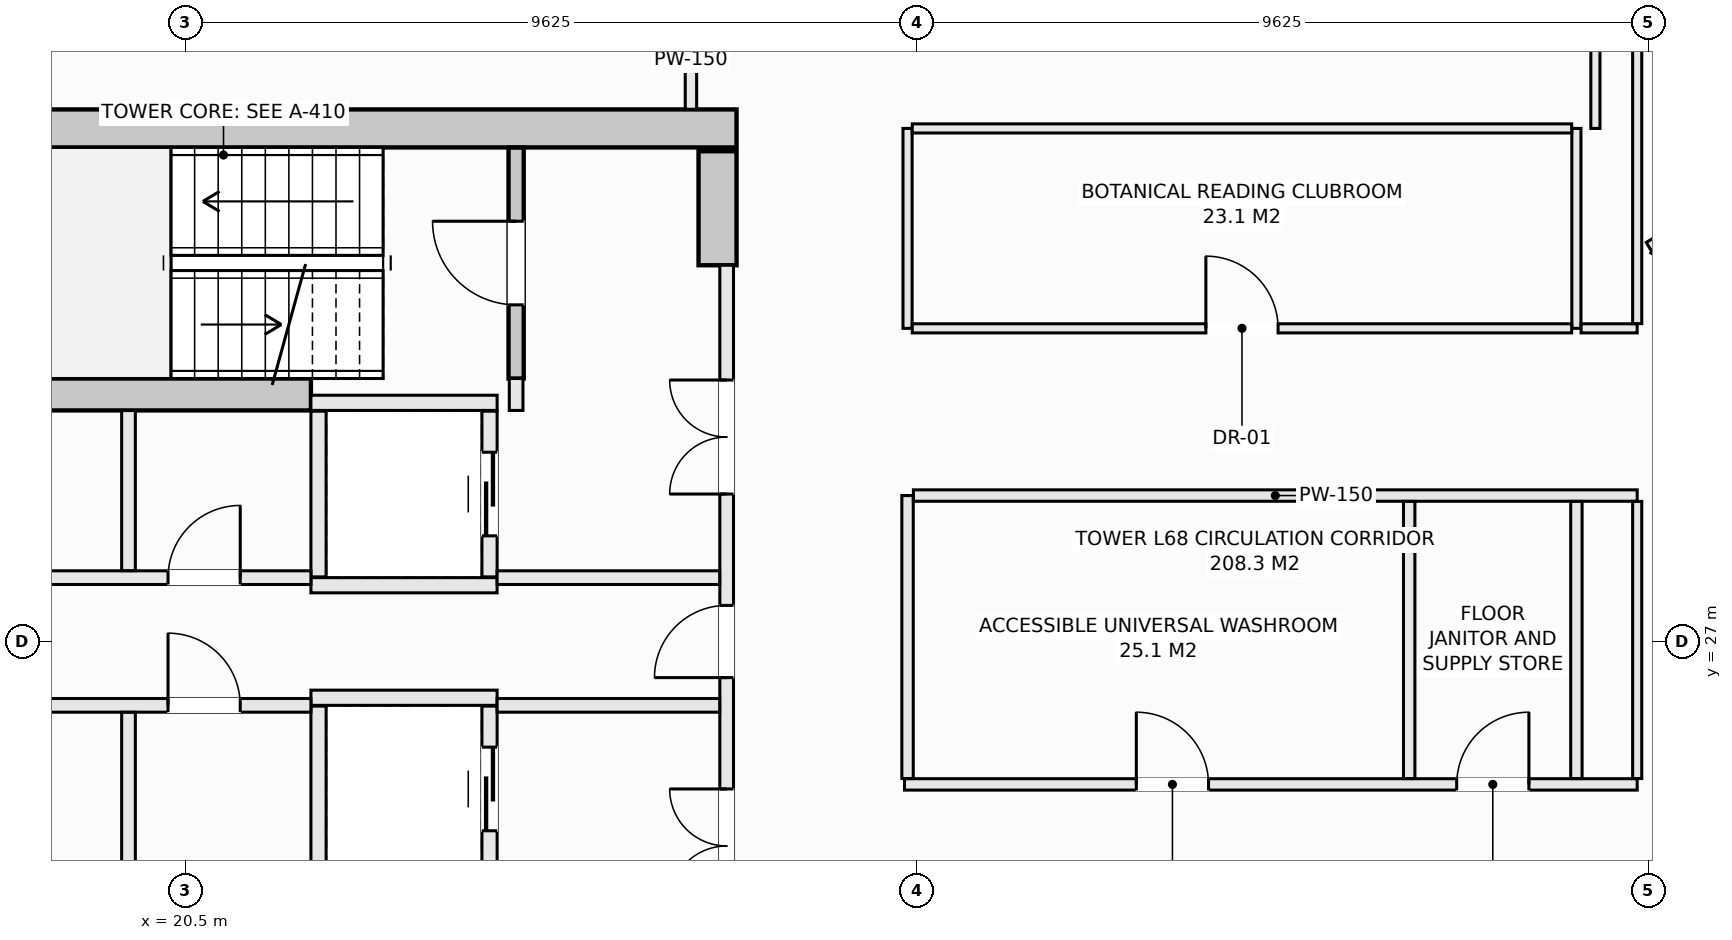
"""IFC4 building model, lengths in metres.
Left out: names, types, materials, properties, quantities, classifications, styles, units other than length and angle.
Written with IfcOpenShell. Run it as: python <this file> out.ifc"""

import sys

from ifc_helpers import new_model, si_unit, direction, frame, frame_2d, origin, place, context, subcontext, project, spatial, rectangle, extrude, element, fill, save


model = new_model("IFC4")
c1 = context("Model", 3, precision=1e-05, world=origin(), true_north=direction((0.0, 1.0)))
c2 = subcontext(c1, "Body", "Model", "MODEL_VIEW")
j1 = project(units=[si_unit("LENGTHUNIT", "METRE"), si_unit("PLANEANGLEUNIT", "RADIAN")], contexts=[c1])
p1 = place(None, origin())
s1 = spatial("IfcSite", under=j1, at=p1, CompositionType="ELEMENT")
p2 = place(p1, origin())
s2 = spatial("IfcBuilding", under=s1, at=p2, CompositionType="ELEMENT")
p3 = place(p2, frame((0.0, 0.0, 252.5)))
s3 = spatial("IfcBuildingStorey", under=s2, at=p3, CompositionType="ELEMENT", Elevation=252.5)
p4 = place(p3, frame((14.25, 33.75, -0.27), z_axis=(0.0, 0.0, 1.0), x_axis=(1.0, 0.0, 0.0)))
e1 = element("IfcWall", 1, at=p4, inside=s3, PredefinedType="SHEAR", context=c2, shape_type="SweptSolid", body=[
    extrude(rectangle(XDim=13.5, YDim=0.5, at=frame_2d((6.75, 0.0))), origin(), (0.0, 0.0, 1.0), 3.3),
])
p5 = place(p3, frame((27.5, 31.95, -0.27), z_axis=(0.0, 0.0, 1.0), x_axis=(0.0, 1.0, 0.0)))
e2 = element("IfcWall", 2, at=p5, inside=s3, PredefinedType="SHEAR", context=c2, shape_type="SweptSolid", body=[
    extrude(rectangle(XDim=1.5, YDim=0.5, at=frame_2d((0.75, 0.0))), origin(), (0.0, 0.0, 1.0), 3.3),
])
p6 = place(p3, frame((14.85, 30.25, -0.27), z_axis=(0.0, 0.0, 1.0), x_axis=(1.0, 0.0, 0.0)))
e3 = element("IfcWall", 3, at=p6, inside=s3, PredefinedType="SHEAR", context=c2, shape_type="SweptSolid", body=[
    extrude(rectangle(XDim=7.3, YDim=0.42, at=frame_2d((3.65, 0.0))), origin(), (0.0, 0.0, 1.0), 3.3),
])
p7 = place(p3, frame((24.85, 30.46, -0.27), z_axis=(0.0, 0.0, 1.0), x_axis=(0.0, 1.0, 0.0)))
e4 = element("IfcWall", 4, at=p7, inside=s3, PredefinedType="SHEAR", context=c2, shape_type="SweptSolid", body=[
    extrude(rectangle(XDim=3.038, YDim=0.2, at=frame_2d((1.519, 0.0))), origin(), (0.0, 0.0, 1.0), 3.3),
])
p8 = place(p7, frame((0.969, 0.0, 0.27)))
e5 = element("IfcOpeningElement", 5, at=p8, cuts=e4, PredefinedType="OPENING", context=c2, shape_type="SweptSolid", body=[
    extrude(rectangle(XDim=1.1, YDim=2.15, at=frame_2d((0.55, 1.075))), frame((0.0, 0.11, 0.0), z_axis=(0.0, -1.0, 0.0), x_axis=(1.0, 0.0, 0.0)), (0.0, 0.0, 1.0), 0.22),
])
for number, where, z_axis, x_axis in (
    (6, (22.15, 30.14, 0.0), (0.0, 0.0, 1.0), (1.0, 0.0, 0.0)),
    (7, (22.15, 27.74, 0.0), (0.0, 0.0, 1.0), (1.0, 0.0, 0.0)),
):
    element("IfcWall", number, at=place(p3, frame(where, z_axis=z_axis, x_axis=x_axis)), inside=s3, PredefinedType="SOLIDWALL", context=c2, shape_type="SweptSolid", body=[
        extrude(rectangle(XDim=2.45, YDim=0.2, at=frame_2d((1.225, 0.0))), origin(), (0.0, 0.0, 1.0), 3.03),
    ])
p9 = place(p3, frame((22.25, 27.85, 0.0), z_axis=(0.0, 0.0, 1.0), x_axis=(0.0, 1.0, 0.0)))
e8 = element("IfcWall", 8, at=p9, inside=s3, PredefinedType="SOLIDWALL", context=c2, shape_type="SweptSolid", body=[
    extrude(rectangle(XDim=2.18, YDim=0.2, at=frame_2d((1.09, 0.0))), origin(), (0.0, 0.0, 1.0), 3.03),
])
p10 = place(p3, frame((24.5, 27.85, 0.0), z_axis=(0.0, 0.0, 1.0), x_axis=(0.0, 1.0, 0.0)))
e9 = element("IfcWall", 9, at=p10, inside=s3, PredefinedType="SOLIDWALL", context=c2, shape_type="SweptSolid", body=[
    extrude(rectangle(XDim=2.18, YDim=0.2, at=frame_2d((1.09, 0.0))), origin(), (0.0, 0.0, 1.0), 3.03),
])
p11 = place(p10, frame((0.54, 0.0, 0.0)))
e10 = element("IfcOpeningElement", 10, at=p11, cuts=e9, PredefinedType="OPENING", context=c2, shape_type="SweptSolid", body=[
    extrude(rectangle(XDim=1.1, YDim=2.2, at=frame_2d((0.55, 1.1))), frame((0.0, 0.11, 0.0), z_axis=(0.0, -1.0, 0.0), x_axis=(1.0, 0.0, 0.0)), (0.0, 0.0, 1.0), 0.22),
])
p12 = place(p3, frame((22.15, 26.26, 0.0), z_axis=(0.0, 0.0, 1.0), x_axis=(1.0, 0.0, 0.0)))
e11 = element("IfcWall", 11, at=p12, inside=s3, PredefinedType="SOLIDWALL", context=c2, shape_type="SweptSolid", body=[
    extrude(rectangle(XDim=2.45, YDim=0.2, at=frame_2d((1.225, 0.0))), origin(), (0.0, 0.0, 1.0), 3.03),
])
p13 = place(p3, frame((22.25, 23.97, 0.0), z_axis=(0.0, 0.0, 1.0), x_axis=(0.0, 1.0, 0.0)))
e12 = element("IfcWall", 12, at=p13, inside=s3, PredefinedType="SOLIDWALL", context=c2, shape_type="SweptSolid", body=[
    extrude(rectangle(XDim=2.18, YDim=0.2, at=frame_2d((1.09, 0.0))), origin(), (0.0, 0.0, 1.0), 3.03),
])
p14 = place(p3, frame((24.5, 23.97, 0.0), z_axis=(0.0, 0.0, 1.0), x_axis=(0.0, 1.0, 0.0)))
e13 = element("IfcWall", 13, at=p14, inside=s3, PredefinedType="SOLIDWALL", context=c2, shape_type="SweptSolid", body=[
    extrude(rectangle(XDim=2.18, YDim=0.2, at=frame_2d((1.09, 0.0))), origin(), (0.0, 0.0, 1.0), 3.03),
])
p15 = place(p14, frame((0.54, 0.0, 0.0)))
e14 = element("IfcOpeningElement", 14, at=p15, cuts=e13, PredefinedType="OPENING", context=c2, shape_type="SweptSolid", body=[
    extrude(rectangle(XDim=1.1, YDim=2.2, at=frame_2d((0.55, 1.1))), frame((0.0, 0.11, 0.0), z_axis=(0.0, -1.0, 0.0), x_axis=(1.0, 0.0, 0.0)), (0.0, 0.0, 1.0), 0.22),
])
p16 = place(p3, frame((24.85, 30.04, 0.0), z_axis=(0.0, 0.0, 1.0), x_axis=(0.0, 1.0, 0.0)))
e15 = element("IfcWall", 15, at=p16, inside=s3, PredefinedType="SOLIDWALL", context=c2, shape_type="SweptSolid", body=[
    extrude(rectangle(XDim=0.42, YDim=0.18, at=frame_2d((0.21, 0.0))), origin(), (0.0, 0.0, 1.0), 3.03),
])
p17 = place(p3, frame((27.62, 22.05, 0.0), z_axis=(0.0, 0.0, 1.0), x_axis=(0.0, 1.0, 0.0)))
e16 = element("IfcWall", 16, at=p17, inside=s3, PredefinedType="SOLIDWALL", context=c2, shape_type="SweptSolid", body=[
    extrude(rectangle(XDim=9.9, YDim=0.18, at=frame_2d((4.95, 0.0))), origin(), (0.0, 0.0, 1.0), 3.03),
])
p18 = place(p17, frame((4.475, 0.0, 0.0)))
e17 = element("IfcOpeningElement", 17, at=p18, cuts=e16, PredefinedType="OPENING", context=c2, shape_type="SweptSolid", body=[
    extrude(rectangle(XDim=0.95, YDim=2.1, at=frame_2d((0.475, 1.05))), frame((0.0, 0.1, 0.0), z_axis=(0.0, -1.0, 0.0), x_axis=(1.0, 0.0, 0.0)), (0.0, 0.0, 1.0), 0.2),
])
p19 = place(p17, frame((6.89, 0.0, 0.0)))
e18 = element("IfcOpeningElement", 18, at=p19, cuts=e16, PredefinedType="OPENING", context=c2, shape_type="SweptSolid", body=[
    extrude(rectangle(XDim=1.5, YDim=2.2, at=frame_2d((0.75, 1.1))), frame((0.0, 0.1, 0.0), z_axis=(0.0, -1.0, 0.0), x_axis=(1.0, 0.0, 0.0)), (0.0, 0.0, 1.0), 0.2),
])
p20 = place(p17, frame((1.51, 0.0, 0.0)))
e19 = element("IfcOpeningElement", 19, at=p20, cuts=e16, PredefinedType="OPENING", context=c2, shape_type="SweptSolid", body=[
    extrude(rectangle(XDim=1.5, YDim=2.2, at=frame_2d((0.75, 1.1))), frame((0.0, 0.1, 0.0), z_axis=(0.0, -1.0, 0.0), x_axis=(1.0, 0.0, 0.0)), (0.0, 0.0, 1.0), 0.2),
])
p21 = place(p3, frame((15.25, 27.84, 0.0), z_axis=(0.0, 0.0, 1.0), x_axis=(1.0, 0.0, 0.0)))
e20 = element("IfcWall", 20, at=p21, inside=s3, PredefinedType="SOLIDWALL", context=c2, shape_type="SweptSolid", body=[
    extrude(rectangle(XDim=6.9, YDim=0.18, at=frame_2d((3.45, 0.0))), origin(), (0.0, 0.0, 1.0), 3.03),
])
p22 = place(p21, frame((5.02, 0.0, 0.0)))
e21 = element("IfcOpeningElement", 21, at=p22, cuts=e20, PredefinedType="OPENING", context=c2, shape_type="SweptSolid", body=[
    extrude(rectangle(XDim=0.95, YDim=2.1, at=frame_2d((0.475, 1.05))), frame((0.0, 0.1, 0.0), z_axis=(0.0, -1.0, 0.0), x_axis=(1.0, 0.0, 0.0)), (0.0, 0.0, 1.0), 0.2),
])
p23 = place(p21, frame((1.98, 0.0, 0.0)))
e22 = element("IfcOpeningElement", 22, at=p23, cuts=e20, PredefinedType="OPENING", context=c2, shape_type="SweptSolid", body=[
    extrude(rectangle(XDim=0.95, YDim=2.1, at=frame_2d((0.475, 1.05))), frame((0.0, 0.1, 0.0), z_axis=(0.0, -1.0, 0.0), x_axis=(1.0, 0.0, 0.0)), (0.0, 0.0, 1.0), 0.2),
])
p24 = place(p3, frame((24.6, 27.84, 0.0), z_axis=(0.0, 0.0, 1.0), x_axis=(1.0, 0.0, 0.0)))
e23 = element("IfcWall", 23, at=p24, inside=s3, PredefinedType="SOLIDWALL", context=c2, shape_type="SweptSolid", body=[
    extrude(rectangle(XDim=2.928, YDim=0.18, at=frame_2d((1.464, 0.0))), origin(), (0.0, 0.0, 1.0), 3.03),
])
p25 = place(p3, frame((15.25, 26.16, 0.0), z_axis=(0.0, 0.0, 1.0), x_axis=(1.0, 0.0, 0.0)))
e24 = element("IfcWall", 24, at=p25, inside=s3, PredefinedType="SOLIDWALL", context=c2, shape_type="SweptSolid", body=[
    extrude(rectangle(XDim=6.9, YDim=0.18, at=frame_2d((3.45, 0.0))), origin(), (0.0, 0.0, 1.0), 3.03),
])
p26 = place(p25, frame((5.02, 0.0, 0.0)))
e25 = element("IfcOpeningElement", 25, at=p26, cuts=e24, PredefinedType="OPENING", context=c2, shape_type="SweptSolid", body=[
    extrude(rectangle(XDim=0.95, YDim=2.1, at=frame_2d((0.475, 1.05))), frame((0.0, 0.1, 0.0), z_axis=(0.0, -1.0, 0.0), x_axis=(1.0, 0.0, 0.0)), (0.0, 0.0, 1.0), 0.2),
])
p27 = place(p25, frame((1.98, 0.0, 0.0)))
e26 = element("IfcOpeningElement", 26, at=p27, cuts=e24, PredefinedType="OPENING", context=c2, shape_type="SweptSolid", body=[
    extrude(rectangle(XDim=0.95, YDim=2.1, at=frame_2d((0.475, 1.05))), frame((0.0, 0.1, 0.0), z_axis=(0.0, -1.0, 0.0), x_axis=(1.0, 0.0, 0.0)), (0.0, 0.0, 1.0), 0.2),
])
p28 = place(p3, frame((24.6, 26.16, 0.0), z_axis=(0.0, 0.0, 1.0), x_axis=(1.0, 0.0, 0.0)))
e27 = element("IfcWall", 27, at=p28, inside=s3, PredefinedType="SOLIDWALL", context=c2, shape_type="SweptSolid", body=[
    extrude(rectangle(XDim=2.928, YDim=0.18, at=frame_2d((1.464, 0.0))), origin(), (0.0, 0.0, 1.0), 3.03),
])
for number, where, z_axis, x_axis in (
    (28, (19.75, 23.962, 0.0), (0.0, 0.0, 1.0), (0.0, 1.0, 0.0)),
    (29, (19.75, 27.932, 0.0), (0.0, 0.0, 1.0), (0.0, 1.0, 0.0)),
):
    element("IfcWall", number, at=place(p3, frame(where, z_axis=z_axis, x_axis=x_axis)), inside=s3, PredefinedType="SOLIDWALL", context=c2, shape_type="SweptSolid", body=[
        extrude(rectangle(XDim=2.106, YDim=0.18, at=frame_2d((1.053, 0.0))), origin(), (0.0, 0.0, 1.0), 3.03),
    ])
p29 = place(p3, frame((27.15, 34.002, 0.0), z_axis=(0.0, 0.0, 1.0), x_axis=(0.0, 1.0, 0.0)))
e30 = element("IfcWall", 30, at=p29, inside=s3, PredefinedType="PARTITIONING", context=c2, shape_type="SweptSolid", body=[
    extrude(rectangle(XDim=4.198, YDim=0.15, at=frame_2d((2.099, 0.0))), origin(), (0.0, 0.0, 1.0), 3.03),
])
p30 = place(p29, frame((1.998, 0.0, 0.0)))
e31 = element("IfcOpeningElement", 31, at=p30, cuts=e30, PredefinedType="OPENING", context=c2, shape_type="SweptSolid", body=[
    extrude(rectangle(XDim=0.95, YDim=2.1, at=frame_2d((0.475, 1.05))), frame((0.0, 0.085, 0.0), z_axis=(0.0, -1.0, 0.0), x_axis=(1.0, 0.0, 0.0)), (0.0, 0.0, 1.0), 0.17),
])
p31 = place(p3, frame((29.96, 25.12, 0.0), z_axis=(0.0, 0.0, 1.0), x_axis=(1.0, 0.0, 0.0)))
e32 = element("IfcWall", 32, at=p31, inside=s3, PredefinedType="PARTITIONING", context=c2, shape_type="SweptSolid", body=[
    extrude(rectangle(XDim=9.64, YDim=0.15, at=frame_2d((4.82, 0.0))), origin(), (0.0, 0.0, 1.0), 3.03),
])
p32 = place(p31, frame((3.05, 0.0, 0.0)))
e33 = element("IfcOpeningElement", 33, at=p32, cuts=e32, PredefinedType="OPENING", context=c2, shape_type="SweptSolid", body=[
    extrude(rectangle(XDim=0.95, YDim=2.1, at=frame_2d((0.475, 1.05))), frame((0.0, 0.085, 0.0), z_axis=(0.0, -1.0, 0.0), x_axis=(1.0, 0.0, 0.0)), (0.0, 0.0, 1.0), 0.17),
])
p33 = place(p31, frame((7.265, 0.0, 0.0)))
e34 = element("IfcOpeningElement", 34, at=p33, cuts=e32, PredefinedType="OPENING", context=c2, shape_type="SweptSolid", body=[
    extrude(rectangle(XDim=0.95, YDim=2.1, at=frame_2d((0.475, 1.05))), frame((0.0, 0.085, 0.0), z_axis=(0.0, -1.0, 0.0), x_axis=(1.0, 0.0, 0.0)), (0.0, 0.0, 1.0), 0.17),
])
p34 = place(p3, frame((30.0, 25.197, 0.0), z_axis=(0.0, 0.0, 1.0), x_axis=(0.0, 1.0, 0.0)))
e35 = element("IfcWall", 35, at=p34, inside=s3, PredefinedType="PARTITIONING", context=c2, shape_type="SweptSolid", body=[
    extrude(rectangle(XDim=3.723, YDim=0.15, at=frame_2d((1.861, 0.0))), origin(), (0.0, 0.0, 1.0), 3.03),
])
p35 = place(p3, frame((30.0, 31.12, 0.0), z_axis=(0.0, 0.0, 1.0), x_axis=(0.0, 1.0, 0.0)))
e36 = element("IfcWall", 36, at=p35, inside=s3, PredefinedType="PARTITIONING", context=c2, shape_type="SweptSolid", body=[
    extrude(rectangle(XDim=2.63, YDim=0.12, at=frame_2d((1.315, 0.0))), origin(), (0.0, 0.0, 1.0), 3.03),
])
p36 = place(p3, frame((30.077, 28.92, 0.0), z_axis=(0.0, 0.0, 1.0), x_axis=(1.0, 0.0, 0.0)))
e37 = element("IfcWall", 37, at=p36, inside=s3, PredefinedType="PARTITIONING", context=c2, shape_type="SweptSolid", body=[
    extrude(rectangle(XDim=9.523, YDim=0.15, at=frame_2d((4.762, 0.0))), origin(), (0.0, 0.0, 1.0), 3.03),
])
for number, where, z_axis, x_axis in (
    (38, (36.6, 25.197, 0.0), (0.0, 0.0, 1.0), (0.0, 1.0, 0.0)),
    (39, (38.8, 25.197, 0.0), (0.0, 0.0, 1.0), (0.0, 1.0, 0.0)),
):
    element("IfcWall", number, at=place(p3, frame(where, z_axis=z_axis, x_axis=x_axis)), inside=s3, PredefinedType="PARTITIONING", context=c2, shape_type="SweptSolid", body=[
        extrude(rectangle(XDim=3.646, YDim=0.15, at=frame_2d((1.823, 0.0))), origin(), (0.0, 0.0, 1.0), 3.03),
    ])
p37 = place(p3, frame((38.8, 31.12, 0.0), z_axis=(0.0, 0.0, 1.0), x_axis=(0.0, 1.0, 0.0)))
e40 = element("IfcWall", 40, at=p37, inside=s3, PredefinedType="PARTITIONING", context=c2, shape_type="SweptSolid", body=[
    extrude(rectangle(XDim=2.63, YDim=0.12, at=frame_2d((1.315, 0.0))), origin(), (0.0, 0.0, 1.0), 3.03),
])
p38 = place(p3, frame((30.062, 31.12, 0.0), z_axis=(0.0, 0.0, 1.0), x_axis=(1.0, 0.0, 0.0)))
e41 = element("IfcWall", 41, at=p38, inside=s3, PredefinedType="PARTITIONING", context=c2, shape_type="SweptSolid", body=[
    extrude(rectangle(XDim=8.676, YDim=0.12, at=frame_2d((4.338, 0.0))), origin(), (0.0, 0.0, 1.0), 3.03),
])
p39 = place(p38, frame((3.863, 0.0, 0.0)))
e42 = element("IfcOpeningElement", 42, at=p39, cuts=e41, PredefinedType="OPENING", context=c2, shape_type="SweptSolid", body=[
    extrude(rectangle(XDim=0.95, YDim=2.1, at=frame_2d((0.475, 1.05))), frame((0.0, 0.07, 0.0), z_axis=(0.0, -1.0, 0.0), x_axis=(1.0, 0.0, 0.0)), (0.0, 0.0, 1.0), 0.14),
])
p40 = place(p3, frame((38.862, 31.12, 0.0), z_axis=(0.0, 0.0, 1.0), x_axis=(1.0, 0.0, 0.0)))
e43 = element("IfcWall", 43, at=p40, inside=s3, PredefinedType="PARTITIONING", context=c2, shape_type="SweptSolid", body=[
    extrude(rectangle(XDim=0.738, YDim=0.12, at=frame_2d((0.369, 0.0))), origin(), (0.0, 0.0, 1.0), 3.03),
])
p41 = place(p3, frame((30.062, 33.75, 0.0), z_axis=(0.0, 0.0, 1.0), x_axis=(1.0, 0.0, 0.0)))
e44 = element("IfcWall", 44, at=p41, inside=s3, PredefinedType="PARTITIONING", context=c2, shape_type="SweptSolid", body=[
    extrude(rectangle(XDim=8.676, YDim=0.12, at=frame_2d((4.338, 0.0))), origin(), (0.0, 0.0, 1.0), 3.03),
])
p42 = place(p3, frame((39.05, 33.75, 0.0), z_axis=(0.0, 0.0, 1.0), x_axis=(0.0, 1.0, 0.0)))
e45 = element("IfcWall", 45, at=p42, inside=s3, PredefinedType="PARTITIONING", context=c2, shape_type="SweptSolid", body=[
    extrude(rectangle(XDim=1.938, YDim=0.12, at=frame_2d((0.969, 0.0))), origin(), (0.0, 0.0, 1.0), 3.03),
])
p43 = place(p3, frame((39.6, 25.197, 0.0), z_axis=(0.0, 0.0, 1.0), x_axis=(0.0, 1.0, 0.0)))
e46 = element("IfcWall", 46, at=p43, inside=s3, PredefinedType="PARTITIONING", context=c2, shape_type="SweptSolid", body=[
    extrude(rectangle(XDim=3.646, YDim=0.12, at=frame_2d((1.823, 0.0))), origin(), (0.0, 0.0, 1.0), 3.03),
])
p44 = place(p3, frame((39.6, 31.182, 0.0), z_axis=(0.0, 0.0, 1.0), x_axis=(0.0, 1.0, 0.0)))
e47 = element("IfcWall", 47, at=p44, inside=s3, PredefinedType="PARTITIONING", context=c2, shape_type="SweptSolid", body=[
    extrude(rectangle(XDim=7.866, YDim=0.12, at=frame_2d((3.933, 0.0))), origin(), (0.0, 0.0, 1.0), 3.03),
])
p45 = place(p3, frame((39.75, 32.199, 0.0), z_axis=(0.0, 0.0, 1.0), x_axis=(0.857702120906, 0.514146935996, 0.0)))
e48 = element("IfcWall", 48, at=p45, inside=s3, PredefinedType="PARTITIONING", context=c2, shape_type="SweptSolid", body=[
    extrude(rectangle(XDim=1.441, YDim=0.12, at=frame_2d((0.721, 0.0))), origin(), (0.0, 0.0, 1.0), 3.03),
])
p46 = place(p3, frame((39.81, 32.163, 0.0), z_axis=(0.0, 0.0, 1.0), x_axis=(0.858011245414, -0.513630901273, 0.0)))
e49 = element("IfcWall", 49, at=p46, inside=s3, PredefinedType="PARTITIONING", context=c2, shape_type="SweptSolid", body=[
    extrude(rectangle(XDim=1.37, YDim=0.12, at=frame_2d((0.685, 0.0))), origin(), (0.0, 0.0, 1.0), 3.03),
])
p47 = place(p8, origin())
e50 = element("IfcDoor", 50, at=p47, inside=s3, OperationType="SINGLE_SWING_RIGHT", PredefinedType="DOOR", context=c2, shape_type="SweptSolid", body=[
    extrude(rectangle(XDim=1.1, YDim=2.15, at=frame_2d((0.55, 1.075))), frame((0.0, 0.025, 0.0), z_axis=(0.0, -1.0, 0.0), x_axis=(1.0, 0.0, 0.0)), (0.0, 0.0, 1.0), 0.05),
])
fill(e5, e50)
p48 = place(p11, origin())
e51 = element("IfcDoor", 51, at=p48, inside=s3, OperationType="SLIDING_TO_LEFT", PredefinedType="DOOR", context=c2, shape_type="SweptSolid", body=[
    extrude(rectangle(XDim=1.1, YDim=2.2, at=frame_2d((0.55, 1.1))), frame((0.0, 0.025, 0.0), z_axis=(0.0, -1.0, 0.0), x_axis=(1.0, 0.0, 0.0)), (0.0, 0.0, 1.0), 0.05),
])
fill(e10, e51)
p49 = place(p15, origin())
e52 = element("IfcDoor", 52, at=p49, inside=s3, OperationType="SLIDING_TO_LEFT", PredefinedType="DOOR", context=c2, shape_type="SweptSolid", body=[
    extrude(rectangle(XDim=1.1, YDim=2.2, at=frame_2d((0.55, 1.1))), frame((0.0, 0.025, 0.0), z_axis=(0.0, -1.0, 0.0), x_axis=(1.0, 0.0, 0.0)), (0.0, 0.0, 1.0), 0.05),
])
fill(e14, e52)
p50 = place(p18, origin())
e53 = element("IfcDoor", 53, at=p50, inside=s3, OperationType="SINGLE_SWING_LEFT", PredefinedType="DOOR", context=c2, shape_type="SweptSolid", body=[
    extrude(rectangle(XDim=0.95, YDim=2.1, at=frame_2d((0.475, 1.05))), frame((0.0, 0.025, 0.0), z_axis=(0.0, -1.0, 0.0), x_axis=(1.0, 0.0, 0.0)), (0.0, 0.0, 1.0), 0.05),
])
fill(e17, e53)
p51 = place(p19, origin())
e54 = element("IfcDoor", 54, at=p51, inside=s3, OperationType="DOUBLE_DOOR_SINGLE_SWING", PredefinedType="DOOR", context=c2, shape_type="SweptSolid", body=[
    extrude(rectangle(XDim=1.5, YDim=2.2, at=frame_2d((0.75, 1.1))), frame((0.0, 0.025, 0.0), z_axis=(0.0, -1.0, 0.0), x_axis=(1.0, 0.0, 0.0)), (0.0, 0.0, 1.0), 0.05),
])
fill(e18, e54)
p52 = place(p20, origin())
e55 = element("IfcDoor", 55, at=p52, inside=s3, OperationType="DOUBLE_DOOR_SINGLE_SWING", PredefinedType="DOOR", context=c2, shape_type="SweptSolid", body=[
    extrude(rectangle(XDim=1.5, YDim=2.2, at=frame_2d((0.75, 1.1))), frame((0.0, 0.025, 0.0), z_axis=(0.0, -1.0, 0.0), x_axis=(1.0, 0.0, 0.0)), (0.0, 0.0, 1.0), 0.05),
])
fill(e19, e55)
p53 = place(p22, origin())
e56 = element("IfcDoor", 56, at=p53, inside=s3, OperationType="SINGLE_SWING_RIGHT", PredefinedType="DOOR", context=c2, shape_type="SweptSolid", body=[
    extrude(rectangle(XDim=0.95, YDim=2.1, at=frame_2d((0.475, 1.05))), frame((0.0, 0.025, 0.0), z_axis=(0.0, -1.0, 0.0), x_axis=(1.0, 0.0, 0.0)), (0.0, 0.0, 1.0), 0.05),
])
fill(e21, e56)
p54 = place(p26, origin())
e57 = element("IfcDoor", 57, at=p54, inside=s3, OperationType="SINGLE_SWING_LEFT", PredefinedType="DOOR", context=c2, shape_type="SweptSolid", body=[
    extrude(rectangle(XDim=0.95, YDim=2.1, at=frame_2d((0.475, 1.05))), frame((0.0, 0.025, 0.0), z_axis=(0.0, -1.0, 0.0), x_axis=(1.0, 0.0, 0.0)), (0.0, 0.0, 1.0), 0.05),
])
fill(e25, e57)
p55 = place(p32, origin())
e58 = element("IfcDoor", 58, at=p55, inside=s3, OperationType="SINGLE_SWING_LEFT", PredefinedType="DOOR", context=c2, shape_type="SweptSolid", body=[
    extrude(rectangle(XDim=0.95, YDim=2.1, at=frame_2d((0.475, 1.05))), frame((0.0, 0.025, 0.0), z_axis=(0.0, -1.0, 0.0), x_axis=(1.0, 0.0, 0.0)), (0.0, 0.0, 1.0), 0.05),
])
fill(e33, e58)
p56 = place(p33, origin())
e59 = element("IfcDoor", 59, at=p56, inside=s3, OperationType="SINGLE_SWING_RIGHT", PredefinedType="DOOR", context=c2, shape_type="SweptSolid", body=[
    extrude(rectangle(XDim=0.95, YDim=2.1, at=frame_2d((0.475, 1.05))), frame((0.0, 0.025, 0.0), z_axis=(0.0, -1.0, 0.0), x_axis=(1.0, 0.0, 0.0)), (0.0, 0.0, 1.0), 0.05),
])
fill(e34, e59)
p57 = place(p39, origin())
e60 = element("IfcDoor", 60, at=p57, inside=s3, OperationType="SINGLE_SWING_LEFT", PredefinedType="DOOR", context=c2, shape_type="SweptSolid", body=[
    extrude(rectangle(XDim=0.95, YDim=2.1, at=frame_2d((0.475, 1.05))), frame((0.0, 0.025, 0.0), z_axis=(0.0, -1.0, 0.0), x_axis=(1.0, 0.0, 0.0)), (0.0, 0.0, 1.0), 0.05),
])
fill(e42, e60)
save(model, sys.argv[1])
